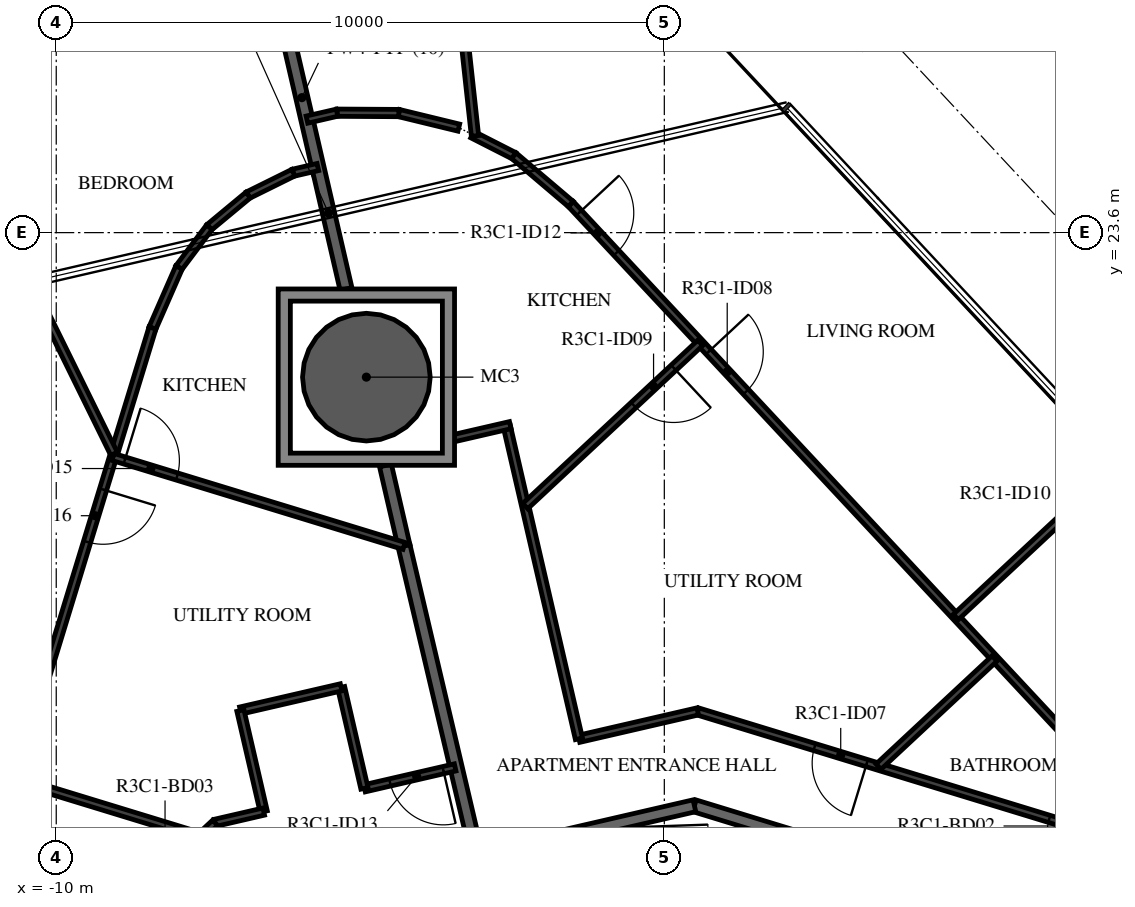
"""IFC4 building model, lengths in metres.
Left out: names, types, materials, properties, quantities, classifications, styles, units other than length and angle.
Written with IfcOpenShell. Run it as: python <this file> out.ifc"""

import sys

from ifc_helpers import new_model, si_unit, direction, frame, frame_2d, origin, origin_2d, place, context, subcontext, project, spatial, polyline, rectangle, hollow_circle, outline, extrude, element, fill, save


model = new_model("IFC4")
c1 = context("Model", 3, precision=1e-05, world=origin(), true_north=direction((0.0, 1.0)))
c2 = subcontext(c1, "Body", "Model", "MODEL_VIEW")
j1 = project(units=[si_unit("LENGTHUNIT", "METRE"), si_unit("PLANEANGLEUNIT", "RADIAN")], contexts=[c1])
p1 = place(None, origin())
s1 = spatial("IfcSite", under=j1, at=p1, CompositionType="ELEMENT")
p2 = place(p1, origin())
s2 = spatial("IfcBuilding", under=s1, at=p2, CompositionType="ELEMENT")
p3 = place(p2, frame((0.0, 0.0, 137.9)))
s3 = spatial("IfcBuildingStorey", under=s2, at=p3, CompositionType="ELEMENT", Elevation=137.9)
p4 = place(p3, frame((-4.9, 21.223, -0.38), z_axis=(0.0, 0.0, 1.0), x_axis=(1.0, 0.0, 0.0)))
e1 = element("IfcColumn", 1, at=p4, inside=s3, PredefinedType="COLUMN", context=c2, shape_type="SweptSolid", body=[
    extrude(hollow_circle(Radius=1.05, WallThickness=0.05, at=origin_2d()), origin(), (0.0, 0.0, 1.0), 3.5),
])
p5 = place(p3, frame((-0.487, 13.948, 0.0), z_axis=(0.0, 0.0, 1.0), x_axis=(0.034859752231, -0.999392214135, 0.0)))
e2 = element("IfcWall", 2, at=p5, inside=s3, PredefinedType="PARTITIONING", context=c2, shape_type="SweptSolid", body=[
    extrude(rectangle(XDim=2.052, YDim=0.12, at=frame_2d((1.026, 0.0))), origin(), (0.0, 0.0, 1.0), 3.12),
])
p6 = place(p5, frame((0.125, 0.0, 0.0)))
e3 = element("IfcOpeningElement", 3, at=p6, cuts=e2, PredefinedType="OPENING", context=c2, shape_type="SweptSolid", body=[
    extrude(rectangle(XDim=1.2, YDim=2.1, at=frame_2d((0.6, 1.05))), frame((0.0, 0.07, 0.0), z_axis=(0.0, -1.0, 0.0), x_axis=(1.0, 0.0, 0.0)), (0.0, 0.0, 1.0), 0.14),
])
p7 = place(p3, frame((7.516, 12.028, 0.0), z_axis=(0.0, 0.0, 1.0), x_axis=(-0.956306642771, 0.292365533182, 0.0)))
e4 = element("IfcWall", 4, at=p7, inside=s3, PredefinedType="STANDARD", context=c2, shape_type="SweptSolid", body=[
    extrude(rectangle(XDim=7.342, YDim=0.2, at=frame_2d((3.671, 0.0))), origin(), (0.0, 0.0, 1.0), 3.12),
])
p8 = place(p3, frame((0.495, 14.175, 0.0), z_axis=(0.0, 0.0, 1.0), x_axis=(-0.974376622151, -0.224922649383, 0.0)))
e5 = element("IfcWall", 5, at=p8, inside=s3, PredefinedType="STANDARD", context=c2, shape_type="SweptSolid", body=[
    extrude(rectangle(XDim=7.342, YDim=0.2, at=frame_2d((3.671, 0.0))), origin(), (0.0, 0.0, 1.0), 3.12),
])
p9 = place(p3, frame((-4.281, 18.448, 0.0), z_axis=(0.0, 0.0, 1.0), x_axis=(0.228867856942, -0.973457499873, 0.0)))
e6 = element("IfcWall", 6, at=p9, inside=s3, PredefinedType="STANDARD", context=c2, shape_type="SweptSolid", body=[
    extrude(rectangle(XDim=5.238, YDim=0.2, at=frame_2d((2.619, 0.0))), origin(), (0.0, 0.0, 1.0), 3.12),
])
p10 = place(p3, frame((-4.586, 19.771, 0.0), z_axis=(0.0, 0.0, 1.0), x_axis=(0.224898895484, -0.974382105136, 0.0)))
e7 = element("IfcWall", 7, at=p10, inside=s3, PredefinedType="STANDARD", context=c2, shape_type="SweptSolid", body=[
    extrude(rectangle(XDim=1.358, YDim=0.2, at=frame_2d((0.679, 0.0))), origin(), (0.0, 0.0, 1.0), 3.12),
])
p11 = place(p3, frame((-6.687, 28.966, 0.0), z_axis=(0.0, 0.0, 1.0), x_axis=(0.224945100086, -0.974371439415, 0.0)))
e8 = element("IfcWall", 8, at=p11, inside=s3, PredefinedType="STANDARD", context=c2, shape_type="SweptSolid", body=[
    extrude(rectangle(XDim=6.458, YDim=0.2, at=frame_2d((3.229, 0.0))), origin(), (0.0, 0.0, 1.0), 3.12),
])
p12 = place(p3, frame((8.339, 13.345, 0.0), z_axis=(0.0, 0.0, 1.0), x_axis=(-0.956310145342, 0.292354076276, 0.0)))
e9 = element("IfcWall", 9, at=p12, inside=s3, PredefinedType="PARTITIONING", context=c2, shape_type="SweptSolid", body=[
    extrude(rectangle(XDim=8.146, YDim=0.12, at=frame_2d((4.073, 0.0))), origin(), (0.0, 0.0, 1.0), 3.12),
])
p13 = place(p12, frame((1.3, 0.0, 0.0)))
e10 = element("IfcOpeningElement", 10, at=p13, cuts=e9, PredefinedType="OPENING", context=c2, shape_type="SweptSolid", body=[
    extrude(rectangle(XDim=0.8, YDim=2.1, at=frame_2d((0.4, 1.05))), frame((0.0, 0.07, 0.0), z_axis=(0.0, -1.0, 0.0), x_axis=(1.0, 0.0, 0.0)), (0.0, 0.0, 1.0), 0.14),
])
p14 = place(p12, frame((5.237, 0.0, 0.0)))
e11 = element("IfcOpeningElement", 11, at=p14, cuts=e9, PredefinedType="OPENING", context=c2, shape_type="SweptSolid", body=[
    extrude(rectangle(XDim=0.9, YDim=2.1, at=frame_2d((0.45, 1.05))), frame((0.0, 0.07, 0.0), z_axis=(0.0, -1.0, 0.0), x_axis=(1.0, 0.0, 0.0)), (0.0, 0.0, 1.0), 0.14),
])
p15 = place(p3, frame((0.549, 15.727, 0.0), z_axis=(0.0, 0.0, 1.0), x_axis=(-0.97436861061, -0.224957352975, 0.0)))
e12 = element("IfcWall", 12, at=p15, inside=s3, PredefinedType="PARTITIONING", context=c2, shape_type="SweptSolid", body=[
    extrude(rectangle(XDim=2.004, YDim=0.12, at=frame_2d((1.002, 0.0))), origin(), (0.0, 0.0, 1.0), 3.12),
])
p16 = place(p3, frame((-1.404, 15.276, 0.0), z_axis=(0.0, 0.0, 1.0), x_axis=(-0.224947305813, 0.974370930194, 0.0)))
e13 = element("IfcWall", 13, at=p16, inside=s3, PredefinedType="PARTITIONING", context=c2, shape_type="SweptSolid", body=[
    extrude(rectangle(XDim=5.28, YDim=0.12, at=frame_2d((2.64, 0.0))), origin(), (0.0, 0.0, 1.0), 3.12),
])
p17 = place(p3, frame((-2.533, 20.434, 0.0), z_axis=(0.0, 0.0, 1.0), x_axis=(-0.974387124574, -0.224877147491, 0.0)))
e14 = element("IfcWall", 14, at=p17, inside=s3, PredefinedType="PARTITIONING", context=c2, shape_type="SweptSolid", body=[
    extrude(rectangle(XDim=1.011, YDim=0.12, at=frame_2d((0.505, 0.0))), origin(), (0.0, 0.0, 1.0), 3.12),
])
p18 = place(p3, frame((-1.539, 24.071, 0.0), z_axis=(0.0, 0.0, 1.0), x_axis=(0.68200220595, -0.731350115252, 0.0)))
e15 = element("IfcWall", 15, at=p18, inside=s3, PredefinedType="PARTITIONING", context=c2, shape_type="SweptSolid", body=[
    extrude(rectangle(XDim=17.316, YDim=0.12, at=frame_2d((8.658, 0.0))), origin(), (0.0, 0.0, 1.0), 3.12),
])
p19 = place(p18, frame((3.323, 0.0, 0.0)))
e16 = element("IfcOpeningElement", 16, at=p19, cuts=e15, PredefinedType="OPENING", context=c2, shape_type="SweptSolid", body=[
    extrude(rectangle(XDim=0.9, YDim=2.1, at=frame_2d((0.45, 1.05))), frame((0.0, 0.07, 0.0), z_axis=(0.0, -1.0, 0.0), x_axis=(1.0, 0.0, 0.0)), (0.0, 0.0, 1.0), 0.14),
])
p20 = place(p18, frame((0.2, 0.0, 0.0)))
e17 = element("IfcOpeningElement", 17, at=p20, cuts=e15, PredefinedType="OPENING", context=c2, shape_type="SweptSolid", body=[
    extrude(rectangle(XDim=0.9, YDim=2.1, at=frame_2d((0.45, 1.05))), frame((0.0, 0.07, 0.0), z_axis=(0.0, -1.0, 0.0), x_axis=(1.0, 0.0, 0.0)), (0.0, 0.0, 1.0), 0.14),
])
p21 = place(p3, frame((7.427, 19.734, 0.0), z_axis=(0.0, 0.0, 1.0), x_axis=(-0.73139345201, -0.681955730497, 0.0)))
e18 = element("IfcWall", 18, at=p21, inside=s3, PredefinedType="PARTITIONING", context=c2, shape_type="SweptSolid", body=[
    extrude(rectangle(XDim=3.6, YDim=0.12, at=frame_2d((1.8, 0.0))), origin(), (0.0, 0.0, 1.0), 2.73),
])
p22 = place(p21, frame((0.2, 0.0, 0.0)))
e19 = element("IfcOpeningElement", 19, at=p22, cuts=e18, PredefinedType="OPENING", context=c2, shape_type="SweptSolid", body=[
    extrude(rectangle(XDim=0.9, YDim=2.1, at=frame_2d((0.45, 1.05))), frame((0.0, 0.07, 0.0), z_axis=(0.0, -1.0, 0.0), x_axis=(1.0, 0.0, 0.0)), (0.0, 0.0, 1.0), 0.14),
])
p23 = place(p3, frame((5.431, 16.597, 0.0), z_axis=(0.0, 0.0, 1.0), x_axis=(-0.731378807316, -0.681971436505, 0.0)))
e20 = element("IfcWall", 20, at=p23, inside=s3, PredefinedType="PARTITIONING", context=c2, shape_type="SweptSolid", body=[
    extrude(rectangle(XDim=2.609, YDim=0.12, at=frame_2d((1.305, 0.0))), origin(), (0.0, 0.0, 1.0), 3.12),
])
p24 = place(p3, frame((-3.156, 25.212, 0.0), z_axis=(0.0, 0.0, 1.0), x_axis=(0.890954246936, -0.454093085025, 0.0)))
e21 = element("IfcWall", 21, at=p24, inside=s3, PredefinedType="PARTITIONING", context=c2, shape_type="SweptSolid", body=[
    extrude(rectangle(XDim=0.765, YDim=0.12, at=frame_2d((0.383, 0.0))), origin(), (0.0, 0.0, 1.0), 3.12),
])
p25 = place(p3, frame((-2.474, 24.865, 0.0), z_axis=(0.0, 0.0, 1.0), x_axis=(0.762351487461, -0.647163201647, 0.0)))
e22 = element("IfcWall", 22, at=p25, inside=s3, PredefinedType="PARTITIONING", context=c2, shape_type="SweptSolid", body=[
    extrude(rectangle(XDim=1.227, YDim=0.12, at=frame_2d((0.614, 0.0))), origin(), (0.0, 0.0, 1.0), 3.12),
])
p26 = place(p3, frame((-3.538, 29.07, 0.0), z_axis=(0.0, 0.0, 1.0), x_axis=(0.1087420482, -0.994070001033, 0.0)))
e23 = element("IfcWall", 23, at=p26, inside=s3, PredefinedType="PARTITIONING", context=c2, shape_type="SweptSolid", body=[
    extrude(rectangle(XDim=3.902, YDim=0.12, at=frame_2d((1.951, 0.0))), origin(), (0.0, 0.0, 1.0), 3.12),
])
p27 = place(p26, frame((0.2, 0.0, 0.0)))
e24 = element("IfcOpeningElement", 24, at=p27, cuts=e23, PredefinedType="OPENING", context=c2, shape_type="SweptSolid", body=[
    extrude(rectangle(XDim=0.9, YDim=2.1, at=frame_2d((0.45, 1.05))), frame((0.0, 0.07, 0.0), z_axis=(0.0, -1.0, 0.0), x_axis=(1.0, 0.0, 0.0)), (0.0, 0.0, 1.0), 0.14),
])
p28 = place(p3, frame((0.591, 21.787, 0.0), z_axis=(0.0, 0.0, 1.0), x_axis=(-0.731364619453, -0.681986651931, 0.0)))
e25 = element("IfcWall", 25, at=p28, inside=s3, PredefinedType="PARTITIONING", context=c2, shape_type="SweptSolid", body=[
    extrude(rectangle(XDim=3.936, YDim=0.12, at=frame_2d((1.968, 0.0))), origin(), (0.0, 0.0, 1.0), 3.12),
])
p29 = place(p28, frame((0.6, 0.0, 0.0)))
e26 = element("IfcOpeningElement", 26, at=p29, cuts=e25, PredefinedType="OPENING", context=c2, shape_type="SweptSolid", body=[
    extrude(rectangle(XDim=0.9, YDim=2.1, at=frame_2d((0.45, 1.05))), frame((0.0, 0.07, 0.0), z_axis=(0.0, -1.0, 0.0), x_axis=(1.0, 0.0, 0.0)), (0.0, 0.0, 1.0), 0.14),
])
p30 = place(p3, frame((-3.379, 25.326, 0.0), z_axis=(0.0, 0.0, 1.0), x_axis=(-0.971704876381, 0.236198292157, 0.0)))
e27 = element("IfcWall", 27, at=p30, inside=s3, PredefinedType="PARTITIONING", context=c2, shape_type="SweptSolid", body=[
    extrude(rectangle(XDim=1.016, YDim=0.12, at=frame_2d((0.508, 0.0))), origin(), (0.0, 0.0, 1.0), 3.12),
])
p31 = place(p3, frame((-4.367, 25.566, 0.0), z_axis=(0.0, 0.0, 1.0), x_axis=(-0.999983366401, 0.005767748328, 0.0)))
e28 = element("IfcWall", 28, at=p31, inside=s3, PredefinedType="PARTITIONING", context=c2, shape_type="SweptSolid", body=[
    extrude(rectangle(XDim=1.016, YDim=0.12, at=frame_2d((0.508, 0.0))), origin(), (0.0, 0.0, 1.0), 3.12),
])
p32 = place(p3, frame((-5.383, 25.572, 0.0), z_axis=(0.0, 0.0, 1.0), x_axis=(-0.974366885246, -0.224964825997, 0.0)))
e29 = element("IfcWall", 29, at=p32, inside=s3, PredefinedType="PARTITIONING", context=c2, shape_type="SweptSolid", body=[
    extrude(rectangle(XDim=0.508, YDim=0.12, at=frame_2d((0.254, 0.0))), origin(), (0.0, 0.0, 1.0), 3.12),
])
p33 = place(p3, frame((-3.44, 14.806, 0.0), z_axis=(0.0, 0.0, 1.0), x_axis=(-0.974356244071, -0.225010910046, 0.0)))
e30 = element("IfcWall", 30, at=p33, inside=s3, PredefinedType="PARTITIONING", context=c2, shape_type="SweptSolid", body=[
    extrude(rectangle(XDim=1.531, YDim=0.12, at=frame_2d((0.766, 0.0))), origin(), (0.0, 0.0, 1.0), 3.12),
])
p34 = place(p33, frame((0.2, 0.0, 0.0)))
e31 = element("IfcOpeningElement", 31, at=p34, cuts=e30, PredefinedType="OPENING", context=c2, shape_type="SweptSolid", body=[
    extrude(rectangle(XDim=0.9, YDim=2.1, at=frame_2d((0.45, 1.05))), frame((0.0, 0.07, 0.0), z_axis=(0.0, -1.0, 0.0), x_axis=(1.0, 0.0, 0.0)), (0.0, 0.0, 1.0), 0.14),
])
p35 = place(p3, frame((-4.931, 14.461, 0.0), z_axis=(0.0, 0.0, 1.0), x_axis=(-0.224911785629, 0.974379129849, 0.0)))
e32 = element("IfcWall", 32, at=p35, inside=s3, PredefinedType="PARTITIONING", context=c2, shape_type="SweptSolid", body=[
    extrude(rectangle(XDim=1.705, YDim=0.12, at=frame_2d((0.853, 0.0))), origin(), (0.0, 0.0, 1.0), 3.12),
])
p36 = place(p3, frame((-5.315, 16.123, 0.0), z_axis=(0.0, 0.0, 1.0), x_axis=(-0.974352456598, -0.225027310168, 0.0)))
e33 = element("IfcWall", 33, at=p36, inside=s3, PredefinedType="PARTITIONING", context=c2, shape_type="SweptSolid", body=[
    extrude(rectangle(XDim=1.7, YDim=0.12, at=frame_2d((0.85, 0.0))), origin(), (0.0, 0.0, 1.0), 3.12),
])
p37 = place(p3, frame((-6.971, 15.74, 0.0), z_axis=(0.0, 0.0, 1.0), x_axis=(0.224943164347, -0.974371886301, 0.0)))
e34 = element("IfcWall", 34, at=p37, inside=s3, PredefinedType="PARTITIONING", context=c2, shape_type="SweptSolid", body=[
    extrude(rectangle(XDim=1.705, YDim=0.12, at=frame_2d((0.853, 0.0))), origin(), (0.0, 0.0, 1.0), 3.12),
])
p38 = place(p3, frame((-6.588, 14.079, 0.0), z_axis=(0.0, 0.0, 1.0), x_axis=(-0.974391195695, -0.224859506699, 0.0)))
e35 = element("IfcWall", 35, at=p38, inside=s3, PredefinedType="PARTITIONING", context=c2, shape_type="SweptSolid", body=[
    extrude(rectangle(XDim=0.821, YDim=0.12, at=frame_2d((0.41, 0.0))), origin(), (0.0, 0.0, 1.0), 3.12),
])
p39 = place(p3, frame((-7.388, 13.894, 0.0), z_axis=(0.0, 0.0, 1.0), x_axis=(-0.731357186721, -0.681994622729, 0.0)))
e36 = element("IfcWall", 36, at=p39, inside=s3, PredefinedType="PARTITIONING", context=c2, shape_type="SweptSolid", body=[
    extrude(rectangle(XDim=8.146, YDim=0.12, at=frame_2d((4.073, 0.0))), origin(), (0.0, 0.0, 1.0), 3.12),
])
p40 = place(p39, frame((0.725, 0.0, 0.0)))
e37 = element("IfcOpeningElement", 37, at=p40, cuts=e36, PredefinedType="OPENING", context=c2, shape_type="SweptSolid", body=[
    extrude(rectangle(XDim=0.8, YDim=2.1, at=frame_2d((0.4, 1.05))), frame((0.0, 0.07, 0.0), z_axis=(0.0, -1.0, 0.0), x_axis=(1.0, 0.0, 0.0)), (0.0, 0.0, 1.0), 0.14),
])
p41 = place(p39, frame((6.927, 0.0, 0.0)))
e38 = element("IfcOpeningElement", 38, at=p41, cuts=e36, PredefinedType="OPENING", context=c2, shape_type="SweptSolid", body=[
    extrude(rectangle(XDim=0.9, YDim=2.1, at=frame_2d((0.45, 1.05))), frame((0.0, 0.07, 0.0), z_axis=(0.0, -1.0, 0.0), x_axis=(1.0, 0.0, 0.0)), (0.0, 0.0, 1.0), 0.14),
])
p42 = place(p3, frame((-5.698, 24.679, 0.0), z_axis=(0.0, 0.0, 1.0), x_axis=(-0.974222160042, -0.225590742017, 0.0)))
e39 = element("IfcWall", 39, at=p42, inside=s3, PredefinedType="PARTITIONING", context=c2, shape_type="SweptSolid", body=[
    extrude(rectangle(XDim=0.415, YDim=0.12, at=frame_2d((0.207, 0.0))), origin(), (0.0, 0.0, 1.0), 3.12),
])
p43 = place(p3, frame((-6.101, 24.585, 0.0), z_axis=(0.0, 0.0, 1.0), x_axis=(-0.896362871824, -0.443321104862, 0.0)))
e40 = element("IfcWall", 40, at=p43, inside=s3, PredefinedType="PARTITIONING", context=c2, shape_type="SweptSolid", body=[
    extrude(rectangle(XDim=0.829, YDim=0.12, at=frame_2d((0.415, 0.0))), origin(), (0.0, 0.0, 1.0), 3.12),
])
p44 = place(p3, frame((-6.844, 24.218, 0.0), z_axis=(0.0, 0.0, 1.0), x_axis=(-0.769715611418, -0.63838693403, 0.0)))
e41 = element("IfcWall", 41, at=p44, inside=s3, PredefinedType="PARTITIONING", context=c2, shape_type="SweptSolid", body=[
    extrude(rectangle(XDim=0.829, YDim=0.12, at=frame_2d((0.415, 0.0))), origin(), (0.0, 0.0, 1.0), 3.12),
])
p45 = place(p3, frame((-7.482, 23.688, 0.0), z_axis=(0.0, 0.0, 1.0), x_axis=(-0.601836624867, -0.798619231529, 0.0)))
e42 = element("IfcWall", 42, at=p45, inside=s3, PredefinedType="PARTITIONING", context=c2, shape_type="SweptSolid", body=[
    extrude(rectangle(XDim=0.829, YDim=0.12, at=frame_2d((0.415, 0.0))), origin(), (0.0, 0.0, 1.0), 3.12),
])
p46 = place(p3, frame((-7.981, 23.027, 0.0), z_axis=(0.0, 0.0, 1.0), x_axis=(-0.401360750198, -0.915920055573, 0.0)))
e43 = element("IfcWall", 43, at=p46, inside=s3, PredefinedType="PARTITIONING", context=c2, shape_type="SweptSolid", body=[
    extrude(rectangle(XDim=1.087, YDim=0.12, at=frame_2d((0.543, 0.0))), origin(), (0.0, 0.0, 1.0), 3.12),
])
p47 = place(p3, frame((-8.417, 22.031, 0.0), z_axis=(0.0, 0.0, 1.0), x_axis=(-0.292371891841, -0.956304698755, 0.0)))
e44 = element("IfcWall", 44, at=p47, inside=s3, PredefinedType="PARTITIONING", context=c2, shape_type="SweptSolid", body=[
    extrude(rectangle(XDim=13.306, YDim=0.12, at=frame_2d((6.653, 0.0))), origin(), (0.0, 0.0, 1.0), 3.12),
])
p48 = place(p47, frame((2.777, 0.0, 0.0)))
e45 = element("IfcOpeningElement", 45, at=p48, cuts=e44, PredefinedType="OPENING", context=c2, shape_type="SweptSolid", body=[
    extrude(rectangle(XDim=0.9, YDim=2.1, at=frame_2d((0.45, 1.05))), frame((0.0, 0.07, 0.0), z_axis=(0.0, -1.0, 0.0), x_axis=(1.0, 0.0, 0.0)), (0.0, 0.0, 1.0), 0.14),
])
p49 = place(p3, frame((-9.066, 19.91, 0.0), z_axis=(0.0, 0.0, 1.0), x_axis=(0.956313309797, -0.292343724928, 0.0)))
e46 = element("IfcWall", 46, at=p49, inside=s3, PredefinedType="PARTITIONING", context=c2, shape_type="SweptSolid", body=[
    extrude(rectangle(XDim=5.004, YDim=0.12, at=frame_2d((2.502, 0.0))), origin(), (0.0, 0.0, 1.0), 3.12),
])
p50 = place(p49, frame((0.2, 0.0, 0.0)))
e47 = element("IfcOpeningElement", 47, at=p50, cuts=e46, PredefinedType="OPENING", context=c2, shape_type="SweptSolid", body=[
    extrude(rectangle(XDim=0.9, YDim=2.1, at=frame_2d((0.45, 1.05))), frame((0.0, 0.07, 0.0), z_axis=(0.0, -1.0, 0.0), x_axis=(1.0, 0.0, 0.0)), (0.0, 0.0, 1.0), 0.14),
])
p51 = place(p3, frame((-11.716, 25.381, 0.0), z_axis=(0.0, 0.0, 1.0), x_axis=(0.441576881221, -0.897223415862, 0.0)))
e48 = element("IfcWall", 48, at=p51, inside=s3, PredefinedType="PARTITIONING", context=c2, shape_type="SweptSolid", body=[
    extrude(rectangle(XDim=6.039, YDim=0.12, at=frame_2d((3.019, 0.0))), origin(), (0.0, 0.0, 1.0), 3.12),
])
p52 = place(p51, frame((0.6, 0.0, 0.0)))
e49 = element("IfcOpeningElement", 49, at=p52, cuts=e48, PredefinedType="OPENING", context=c2, shape_type="SweptSolid", body=[
    extrude(rectangle(XDim=0.9, YDim=2.1, at=frame_2d((0.45, 1.05))), frame((0.0, 0.07, 0.0), z_axis=(0.0, -1.0, 0.0), x_axis=(1.0, 0.0, 0.0)), (0.0, 0.0, 1.0), 0.14),
])
p53 = place(p3, frame((-10.687, 14.608, 0.0), z_axis=(0.0, 0.0, 1.0), x_axis=(0.956295309419, -0.292402601189, 0.0)))
e50 = element("IfcWall", 50, at=p53, inside=s3, PredefinedType="PARTITIONING", context=c2, shape_type="SweptSolid", body=[
    extrude(rectangle(XDim=3.201, YDim=0.12, at=frame_2d((1.601, 0.0))), origin(), (0.0, 0.0, 1.0), 3.12),
])
p54 = place(p3, origin())
e51 = element("IfcWall", 51, at=p54, inside=s3, PredefinedType="STANDARD", context=c2, shape_type="SweptSolid", body=[
    extrude(outline(polyline([(-3.45, 22.674), (-3.45, 19.773), (-6.35, 19.773), (-6.35, 22.674), (-3.45, 22.674)]), holes=[polyline([(-6.15, 19.973), (-3.65, 19.973), (-3.65, 22.473), (-6.15, 22.473), (-6.15, 19.973)])]), origin(), (0.0, 0.0, 1.0), 3.12),
])
p55 = place(p13, origin())
e52 = element("IfcDoor", 52, at=p55, inside=s3, OperationType="SINGLE_SWING_RIGHT", PredefinedType="DOOR", context=c2, shape_type="SweptSolid", body=[
    extrude(rectangle(XDim=0.8, YDim=2.1, at=frame_2d((0.4, 1.05))), frame((0.0, 0.025, 0.0), z_axis=(0.0, -1.0, 0.0), x_axis=(1.0, 0.0, 0.0)), (0.0, 0.0, 1.0), 0.05),
])
fill(e10, e52)
p56 = place(p14, origin())
e53 = element("IfcDoor", 53, at=p56, inside=s3, OperationType="SINGLE_SWING_RIGHT", PredefinedType="DOOR", context=c2, shape_type="SweptSolid", body=[
    extrude(rectangle(XDim=0.9, YDim=2.1, at=frame_2d((0.45, 1.05))), frame((0.0, 0.025, 0.0), z_axis=(0.0, -1.0, 0.0), x_axis=(1.0, 0.0, 0.0)), (0.0, 0.0, 1.0), 0.05),
])
fill(e11, e53)
p57 = place(p19, origin())
e54 = element("IfcDoor", 54, at=p57, inside=s3, OperationType="SINGLE_SWING_RIGHT", PredefinedType="DOOR", context=c2, shape_type="SweptSolid", body=[
    extrude(rectangle(XDim=0.9, YDim=2.1, at=frame_2d((0.45, 1.05))), frame((0.0, 0.025, 0.0), z_axis=(0.0, -1.0, 0.0), x_axis=(1.0, 0.0, 0.0)), (0.0, 0.0, 1.0), 0.05),
])
fill(e16, e54)
p58 = place(p29, origin())
e55 = element("IfcDoor", 55, at=p58, inside=s3, OperationType="SINGLE_SWING_RIGHT", PredefinedType="DOOR", context=c2, shape_type="SweptSolid", body=[
    extrude(rectangle(XDim=0.9, YDim=2.1, at=frame_2d((0.45, 1.05))), frame((0.0, 0.025, 0.0), z_axis=(0.0, -1.0, 0.0), x_axis=(1.0, 0.0, 0.0)), (0.0, 0.0, 1.0), 0.05),
])
fill(e26, e55)
p59 = place(p20, origin())
e56 = element("IfcDoor", 56, at=p59, inside=s3, OperationType="SINGLE_SWING_LEFT", PredefinedType="DOOR", context=c2, shape_type="SweptSolid", body=[
    extrude(rectangle(XDim=0.9, YDim=2.1, at=frame_2d((0.45, 1.05))), frame((0.0, 0.025, 0.0), z_axis=(0.0, -1.0, 0.0), x_axis=(1.0, 0.0, 0.0)), (0.0, 0.0, 1.0), 0.05),
])
fill(e17, e56)
p60 = place(p34, origin())
e57 = element("IfcDoor", 57, at=p60, inside=s3, OperationType="SINGLE_SWING_LEFT", PredefinedType="DOOR", context=c2, shape_type="SweptSolid", body=[
    extrude(rectangle(XDim=0.9, YDim=2.1, at=frame_2d((0.45, 1.05))), frame((0.0, 0.025, 0.0), z_axis=(0.0, -1.0, 0.0), x_axis=(1.0, 0.0, 0.0)), (0.0, 0.0, 1.0), 0.05),
])
fill(e31, e57)
p61 = place(p50, origin())
e58 = element("IfcDoor", 58, at=p61, inside=s3, OperationType="SINGLE_SWING_LEFT", PredefinedType="DOOR", context=c2, shape_type="SweptSolid", body=[
    extrude(rectangle(XDim=0.9, YDim=2.1, at=frame_2d((0.45, 1.05))), frame((0.0, 0.025, 0.0), z_axis=(0.0, -1.0, 0.0), x_axis=(1.0, 0.0, 0.0)), (0.0, 0.0, 1.0), 0.05),
])
fill(e47, e58)
p62 = place(p48, origin())
e59 = element("IfcDoor", 59, at=p62, inside=s3, OperationType="SINGLE_SWING_LEFT", PredefinedType="DOOR", context=c2, shape_type="SweptSolid", body=[
    extrude(rectangle(XDim=0.9, YDim=2.1, at=frame_2d((0.45, 1.05))), frame((0.0, 0.025, 0.0), z_axis=(0.0, -1.0, 0.0), x_axis=(1.0, 0.0, 0.0)), (0.0, 0.0, 1.0), 0.05),
])
fill(e45, e59)
p63 = place(p6, origin())
e60 = element("IfcDoor", 60, at=p63, inside=s3, OperationType="DOUBLE_DOOR_SINGLE_SWING", PredefinedType="DOOR", context=c2, shape_type="SweptSolid", body=[
    extrude(rectangle(XDim=1.2, YDim=2.1, at=frame_2d((0.6, 1.05))), frame((0.0, 0.025, 0.0), z_axis=(0.0, -1.0, 0.0), x_axis=(1.0, 0.0, 0.0)), (0.0, 0.0, 1.0), 0.05),
])
fill(e3, e60)
save(model, sys.argv[1])
